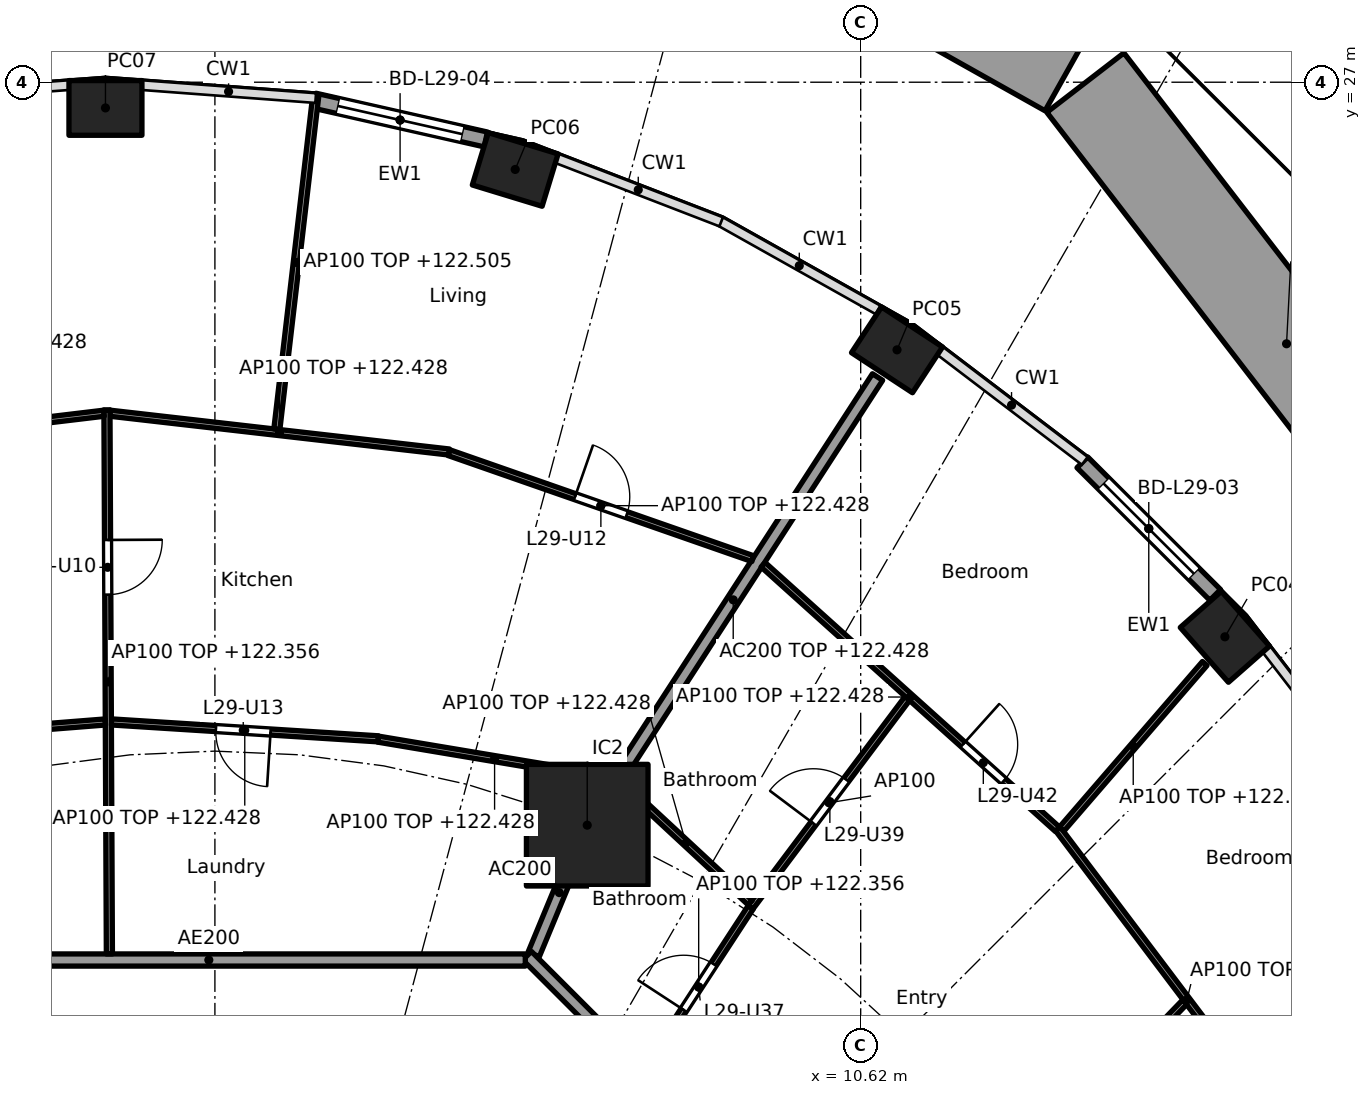
"""IFC4 building model, lengths in metres.
Left out: names, types, materials, properties, quantities, classifications, styles, units other than length and angle.
Written with IfcOpenShell. Run it as: python <this file> out.ifc"""

import sys

from ifc_helpers import new_model, si_unit, direction, frame, frame_2d, origin, origin_2d, place, context, subcontext, project, spatial, rectangle, hollow_rectangle, extrude, element, fill, save


model = new_model("IFC4")
c1 = context("Model", 3, precision=1e-05, world=origin(), true_north=direction((0.0, 1.0)))
c2 = subcontext(c1, "Body", "Model", "MODEL_VIEW")
j1 = project(units=[si_unit("LENGTHUNIT", "METRE"), si_unit("PLANEANGLEUNIT", "RADIAN")], contexts=[c1])
p1 = place(None, origin())
s1 = spatial("IfcSite", under=j1, at=p1, CompositionType="ELEMENT")
p2 = place(p1, origin())
s2 = spatial("IfcBuilding", under=s1, at=p2, CompositionType="ELEMENT")
p3 = place(p2, frame((0.0, 0.0, 119.6)))
s3 = spatial("IfcBuildingStorey", under=s2, at=p3, CompositionType="ELEMENT", Elevation=119.6)
for number, where, z_axis, x_axis in (
    (1, (16.61, 17.88, -0.26), (0.0, 0.0, 1.0), (-0.66, 0.751, 0.0)),
    (2, (11.218, 22.599, -0.26), (0.0, 0.0, 1.0), (-0.836, 0.549, 0.0)),
    (3, (4.938, 25.565, -0.26), (0.0, 0.0, 1.0), (-0.957, 0.292, 0.0)),
    (4, (-1.8, 26.577, -0.26), (0.0, 0.0, 1.0), (-1.0, 0.0, 0.0)),
):
    element("IfcColumn", number, at=place(p3, frame(where, z_axis=z_axis, x_axis=x_axis)), inside=s3, PredefinedType="COLUMN", context=c2, shape_type="SweptSolid", body=[
        extrude(hollow_rectangle(XDim=1.2, YDim=0.9, WallThickness=0.04, at=origin_2d()), origin(), (0.0, 0.0, 1.0), 3.96),
    ])
p4 = place(p3, frame((6.123, 14.782, 0.0), z_axis=(0.0, 0.0, 1.0), x_axis=(1.0, 0.0, 0.0)))
e5 = element("IfcColumn", 5, at=p4, inside=s3, PredefinedType="COLUMN", context=c2, shape_type="SweptSolid", body=[
    extrude(rectangle(XDim=2.0, YDim=2.0, at=origin_2d()), origin(), (0.0, 0.0, 1.0), 3.7),
])
p5 = place(p3, frame((14.265, 20.749, 0.0), z_axis=(0.0, 0.0, 1.0), x_axis=(0.70789728551, -0.706315392135, 0.0)))
e6 = element("IfcWall", 6, at=p5, inside=s3, PredefinedType="SOLIDWALL", context=c2, shape_type="SweptSolid", body=[
    extrude(rectangle(XDim=3.087, YDim=0.25, at=frame_2d((1.543, 0.0))), origin(), (0.0, 0.0, 1.0), 3.44),
])
p6 = place(p5, frame((0.493, 0.0, 0.0)))
e7 = element("IfcOpeningElement", 7, at=p6, cuts=e6, PredefinedType="OPENING", context=c2, shape_type="SweptSolid", body=[
    extrude(rectangle(XDim=2.1, YDim=2.4, at=frame_2d((1.05, 1.2))), frame((0.0, 0.135, 0.0), z_axis=(0.0, -1.0, 0.0), x_axis=(1.0, 0.0, 0.0)), (0.0, 0.0, 1.0), 0.27),
])
p7 = place(p3, frame((1.636, 26.697, 0.0), z_axis=(0.0, 0.0, 1.0), x_axis=(0.975339035722, -0.220711951186, 0.0)))
e8 = element("IfcWall", 8, at=p7, inside=s3, PredefinedType="SOLIDWALL", context=c2, shape_type="SweptSolid", body=[
    extrude(rectangle(XDim=2.89, YDim=0.25, at=frame_2d((1.445, 0.0))), origin(), (0.0, 0.0, 1.0), 3.44),
])
p8 = place(p7, frame((0.395, 0.0, 0.0)))
e9 = element("IfcOpeningElement", 9, at=p8, cuts=e8, PredefinedType="OPENING", context=c2, shape_type="SweptSolid", body=[
    extrude(rectangle(XDim=2.1, YDim=2.4, at=frame_2d((1.05, 1.2))), frame((0.0, 0.135, 0.0), z_axis=(0.0, -1.0, 0.0), x_axis=(1.0, 0.0, 0.0)), (0.0, 0.0, 1.0), 0.27),
])
p9 = place(p3, frame((5.161, 32.215, 0.0), z_axis=(0.0, 0.0, 1.0), x_axis=(0.87197463187, -0.489551061049, 0.0)))
e10 = element("IfcWall", 10, at=p9, inside=s3, PredefinedType="SOLIDWALL", context=c2, shape_type="SweptSolid", body=[
    extrude(rectangle(XDim=10.187, YDim=1.6, at=frame_2d((5.094, 0.0))), origin(), (0.0, 0.0, 1.0), 1.1),
])
p10 = place(p3, frame((14.315, 26.993, 0.0), z_axis=(0.0, 0.0, 1.0), x_axis=(0.610279766338, -0.792185967307, 0.0)))
e11 = element("IfcWall", 11, at=p10, inside=s3, PredefinedType="SOLIDWALL", context=c2, shape_type="SweptSolid", body=[
    extrude(rectangle(XDim=10.842, YDim=1.6, at=frame_2d((5.421, 0.0))), origin(), (0.0, 0.0, 1.0), 1.1),
])
p11 = place(p3, frame((5.243, 12.657, 0.0), z_axis=(0.0, 0.0, 1.0), x_axis=(0.38273085373, 0.923859888513, 0.0)))
e12 = element("IfcWall", 12, at=p11, inside=s3, PredefinedType="PARTITIONING", context=c2, shape_type="SweptSolid", body=[
    extrude(rectangle(XDim=2.199, YDim=0.2, at=frame_2d((1.1, 0.0))), origin(), (0.0, 0.0, 1.0), 3.44),
])
p12 = place(p3, frame((6.15, 14.824, 0.0), z_axis=(0.0, 0.0, 1.0), x_axis=(0.543695254109, 0.839282711998, 0.0)))
e13 = element("IfcWall", 13, at=p12, inside=s3, PredefinedType="PARTITIONING", context=c2, shape_type="SweptSolid", body=[
    extrude(rectangle(XDim=8.731, YDim=0.2, at=frame_2d((4.366, 0.0))), origin(), (0.0, 0.0, 1.0), 2.828),
])
p13 = place(p3, frame((12.635, 5.134, 0.0), z_axis=(0.0, 0.0, 1.0), x_axis=(-0.707106781187, 0.707106781187, 0.0)))
e14 = element("IfcWall", 14, at=p13, inside=s3, PredefinedType="PARTITIONING", context=c2, shape_type="SweptSolid", body=[
    extrude(rectangle(XDim=10.609, YDim=0.2, at=frame_2d((5.305, 0.0))), origin(), (0.0, 0.0, 1.0), 3.44),
])
p14 = place(p13, frame((4.804, 0.0, 0.0)))
e15 = element("IfcOpeningElement", 15, at=p14, cuts=e14, PredefinedType="OPENING", context=c2, shape_type="SweptSolid", body=[
    extrude(rectangle(XDim=1.0, YDim=2.1, at=frame_2d((0.5, 1.05))), frame((0.0, 0.11, 0.0), z_axis=(0.0, -1.0, 0.0), x_axis=(1.0, 0.0, 0.0)), (0.0, 0.0, 1.0), 0.22),
])
p15 = place(p3, frame((5.104, 12.565, 0.0), z_axis=(0.0, 0.0, 1.0), x_axis=(-1.0, 0.0, 0.0)))
e16 = element("IfcWall", 16, at=p15, inside=s3, PredefinedType="PARTITIONING", context=c2, shape_type="SweptSolid", body=[
    extrude(rectangle(XDim=10.409, YDim=0.2, at=frame_2d((5.205, 0.0))), origin(), (0.0, 0.0, 1.0), 3.44),
])
p16 = place(p3, frame((18.106, 9.098, 0.0), z_axis=(0.0, 0.0, 1.0), x_axis=(-0.602398572907, 0.798195439325, 0.0)))
e17 = element("IfcWall", 17, at=p16, inside=s3, PredefinedType="PARTITIONING", context=c2, shape_type="SweptSolid", body=[
    extrude(rectangle(XDim=7.044, YDim=0.1, at=frame_2d((3.522, 0.0))), origin(), (0.0, 0.0, 1.0), 2.828),
])
p17 = place(p3, frame((13.107, 8.929, 0.0), z_axis=(0.0, 0.0, 1.0), x_axis=(0.694592384931, 0.719403515974, 0.0)))
e18 = element("IfcWall", 18, at=p17, inside=s3, PredefinedType="PARTITIONING", context=c2, shape_type="SweptSolid", body=[
    extrude(rectangle(XDim=4.094, YDim=0.1, at=frame_2d((2.047, 0.0))), origin(), (0.0, 0.0, 1.0), 3.44),
])
p18 = place(p17, frame((1.622, 0.0, 0.0)))
e19 = element("IfcOpeningElement", 19, at=p18, cuts=e18, PredefinedType="OPENING", context=c2, shape_type="SweptSolid", body=[
    extrude(rectangle(XDim=0.9, YDim=2.1, at=frame_2d((0.45, 1.05))), frame((0.0, 0.06, 0.0), z_axis=(0.0, -1.0, 0.0), x_axis=(1.0, 0.0, 0.0)), (0.0, 0.0, 1.0), 0.12),
])
p19 = place(p3, frame((13.926, 14.719, 0.0), z_axis=(0.0, 0.0, 1.0), x_axis=(0.653831857253, 0.756639876323, 0.0)))
e20 = element("IfcWall", 20, at=p19, inside=s3, PredefinedType="PARTITIONING", context=c2, shape_type="SweptSolid", body=[
    extrude(rectangle(XDim=3.598, YDim=0.1, at=frame_2d((1.799, 0.0))), origin(), (0.0, 0.0, 1.0), 2.828),
])
p20 = place(p3, frame((13.856, 14.714, 0.0), z_axis=(0.0, 0.0, 1.0), x_axis=(-0.743799395746, 0.668402916577, 0.0)))
e21 = element("IfcWall", 21, at=p20, inside=s3, PredefinedType="PARTITIONING", context=c2, shape_type="SweptSolid", body=[
    extrude(rectangle(XDim=6.509, YDim=0.1, at=frame_2d((3.254, 0.0))), origin(), (0.0, 0.0, 1.0), 2.828),
])
p21 = place(p20, frame((1.19, 0.0, 0.0)))
e22 = element("IfcOpeningElement", 22, at=p21, cuts=e21, PredefinedType="OPENING", context=c2, shape_type="SweptSolid", body=[
    extrude(rectangle(XDim=0.9, YDim=2.1, at=frame_2d((0.45, 1.05))), frame((0.0, 0.06, 0.0), z_axis=(0.0, -1.0, 0.0), x_axis=(1.0, 0.0, 0.0)), (0.0, 0.0, 1.0), 0.12),
])
p22 = place(p3, frame((7.099, 10.808, 0.0), z_axis=(0.0, 0.0, 1.0), x_axis=(0.546709757921, 0.837322184463, 0.0)))
e23 = element("IfcWall", 23, at=p22, inside=s3, PredefinedType="PARTITIONING", context=c2, shape_type="SweptSolid", body=[
    extrude(rectangle(XDim=3.134, YDim=0.1, at=frame_2d((1.567, 0.0))), origin(), (0.0, 0.0, 1.0), 2.756),
])
p23 = place(p22, frame((1.117, 0.0, 0.0)))
e24 = element("IfcOpeningElement", 24, at=p23, cuts=e23, PredefinedType="OPENING", context=c2, shape_type="SweptSolid", body=[
    extrude(rectangle(XDim=0.9, YDim=2.1, at=frame_2d((0.45, 1.05))), frame((0.0, 0.06, 0.0), z_axis=(0.0, -1.0, 0.0), x_axis=(1.0, 0.0, 0.0)), (0.0, 0.0, 1.0), 0.12),
])
p24 = place(p3, frame((8.81, 13.434, 0.0), z_axis=(0.0, 0.0, 1.0), x_axis=(0.600491337497, 0.799631261014, 0.0)))
e25 = element("IfcWall", 25, at=p24, inside=s3, PredefinedType="PARTITIONING", context=c2, shape_type="SweptSolid", body=[
    extrude(rectangle(XDim=4.292, YDim=0.1, at=frame_2d((2.146, 0.0))), origin(), (0.0, 0.0, 1.0), 3.44),
])
p25 = place(p24, frame((1.721, 0.0, 0.0)))
e26 = element("IfcOpeningElement", 26, at=p25, cuts=e25, PredefinedType="OPENING", context=c2, shape_type="SweptSolid", body=[
    extrude(rectangle(XDim=0.9, YDim=2.1, at=frame_2d((0.45, 1.05))), frame((0.0, 0.06, 0.0), z_axis=(0.0, -1.0, 0.0), x_axis=(1.0, 0.0, 0.0)), (0.0, 0.0, 1.0), 0.12),
])
p26 = place(p3, frame((8.803, 13.508, 0.0), z_axis=(0.0, 0.0, 1.0), x_axis=(-0.733124766325, 0.680094167745, 0.0)))
e27 = element("IfcWall", 27, at=p26, inside=s3, PredefinedType="PARTITIONING", context=c2, shape_type="SweptSolid", body=[
    extrude(rectangle(XDim=2.886, YDim=0.1, at=frame_2d((1.443, 0.0))), origin(), (0.0, 0.0, 1.0), 2.828),
])
p27 = place(p3, frame((6.515, 15.556, 0.0), z_axis=(0.0, 0.0, 1.0), x_axis=(-0.986271328884, 0.16513287323, 0.0)))
e28 = element("IfcWall", 28, at=p27, inside=s3, PredefinedType="PARTITIONING", context=c2, shape_type="SweptSolid", body=[
    extrude(rectangle(XDim=3.884, YDim=0.1, at=frame_2d((1.942, 0.0))), origin(), (0.0, 0.0, 1.0), 2.828),
])
p28 = place(p3, frame((8.846, 19.165, 0.0), z_axis=(0.0, 0.0, 1.0), x_axis=(-0.944186503813, 0.329411362915, 0.0)))
e29 = element("IfcWall", 29, at=p28, inside=s3, PredefinedType="PARTITIONING", context=c2, shape_type="SweptSolid", body=[
    extrude(rectangle(XDim=5.293, YDim=0.1, at=frame_2d((2.646, 0.0))), origin(), (0.0, 0.0, 1.0), 2.828),
])
p29 = place(p28, frame((2.197, 0.0, 0.0)))
e30 = element("IfcOpeningElement", 30, at=p29, cuts=e29, PredefinedType="OPENING", context=c2, shape_type="SweptSolid", body=[
    extrude(rectangle(XDim=0.9, YDim=2.1, at=frame_2d((0.45, 1.05))), frame((0.0, 0.06, 0.0), z_axis=(0.0, -1.0, 0.0), x_axis=(1.0, 0.0, 0.0)), (0.0, 0.0, 1.0), 0.12),
])
p30 = place(p3, frame((2.685, 16.202, 0.0), z_axis=(0.0, 0.0, 1.0), x_axis=(-0.998000808042, 0.063201164138, 0.0)))
e31 = element("IfcWall", 31, at=p30, inside=s3, PredefinedType="PARTITIONING", context=c2, shape_type="SweptSolid", body=[
    extrude(rectangle(XDim=4.396, YDim=0.1, at=frame_2d((2.198, 0.0))), origin(), (0.0, 0.0, 1.0), 2.828),
])
p31 = place(p30, frame((1.773, 0.0, 0.0)))
e32 = element("IfcOpeningElement", 32, at=p31, cuts=e31, PredefinedType="OPENING", context=c2, shape_type="SweptSolid", body=[
    extrude(rectangle(XDim=0.9, YDim=2.1, at=frame_2d((0.45, 1.05))), frame((0.0, 0.06, 0.0), z_axis=(0.0, -1.0, 0.0), x_axis=(1.0, 0.0, 0.0)), (0.0, 0.0, 1.0), 0.12),
])
p32 = place(p3, frame((3.851, 20.919, 0.0), z_axis=(0.0, 0.0, 1.0), x_axis=(-0.993519908136, 0.11365822512, 0.0)))
e33 = element("IfcWall", 33, at=p32, inside=s3, PredefinedType="PARTITIONING", context=c2, shape_type="SweptSolid", body=[
    extrude(rectangle(XDim=5.613, YDim=0.1, at=frame_2d((2.806, 0.0))), origin(), (0.0, 0.0, 1.0), 2.828),
])
p33 = place(p3, frame((1.019, 21.293, 0.0), z_axis=(0.0, 0.0, 1.0), x_axis=(0.11589741608, 0.993261188684, 0.0)))
e34 = element("IfcWall", 34, at=p33, inside=s3, PredefinedType="PARTITIONING", context=c2, shape_type="SweptSolid", body=[
    extrude(rectangle(XDim=5.523, YDim=0.1, at=frame_2d((2.762, 0.0))), origin(), (0.0, 0.0, 1.0), 2.905),
])
p34 = place(p3, frame((-1.735, 12.665, 0.0), z_axis=(0.0, 0.0, 1.0), x_axis=(-0.004474716456, 0.999989988406, 0.0)))
e35 = element("IfcWall", 35, at=p34, inside=s3, PredefinedType="PARTITIONING", context=c2, shape_type="SweptSolid", body=[
    extrude(rectangle(XDim=8.948, YDim=0.1, at=frame_2d((4.474, 0.0))), origin(), (0.0, 0.0, 1.0), 2.756),
])
p35 = place(p34, frame((5.908, 0.0, 0.0)))
e36 = element("IfcOpeningElement", 36, at=p35, cuts=e35, PredefinedType="OPENING", context=c2, shape_type="SweptSolid", body=[
    extrude(rectangle(XDim=0.9, YDim=2.1, at=frame_2d((0.45, 1.05))), frame((0.0, 0.06, 0.0), z_axis=(0.0, -1.0, 0.0), x_axis=(1.0, 0.0, 0.0)), (0.0, 0.0, 1.0), 0.12),
])
p36 = place(p3, frame((-1.802, 16.479, 0.0), z_axis=(0.0, 0.0, 1.0), x_axis=(-0.996909003513, -0.078564869469, 0.0)))
e37 = element("IfcWall", 37, at=p36, inside=s3, PredefinedType="PARTITIONING", context=c2, shape_type="SweptSolid", body=[
    extrude(rectangle(XDim=4.686, YDim=0.1, at=frame_2d((2.343, 0.0))), origin(), (0.0, 0.0, 1.0), 2.828),
])
p37 = place(p36, frame((1.868, 0.0, 0.0)))
e38 = element("IfcOpeningElement", 38, at=p37, cuts=e37, PredefinedType="OPENING", context=c2, shape_type="SweptSolid", body=[
    extrude(rectangle(XDim=0.9, YDim=2.1, at=frame_2d((0.45, 1.05))), frame((0.0, 0.06, 0.0), z_axis=(0.0, -1.0, 0.0), x_axis=(1.0, 0.0, 0.0)), (0.0, 0.0, 1.0), 0.12),
])
p38 = place(p3, frame((-1.825, 21.557, 0.0), z_axis=(0.0, 0.0, 1.0), x_axis=(-0.992915657947, -0.118821278412, 0.0)))
e39 = element("IfcWall", 39, at=p38, inside=s3, PredefinedType="PARTITIONING", context=c2, shape_type="SweptSolid", body=[
    extrude(rectangle(XDim=5.765, YDim=0.1, at=frame_2d((2.883, 0.0))), origin(), (0.0, 0.0, 1.0), 2.828),
])
p39 = place(p38, frame((2.408, 0.0, 0.0)))
e40 = element("IfcOpeningElement", 40, at=p39, cuts=e39, PredefinedType="OPENING", context=c2, shape_type="SweptSolid", body=[
    extrude(rectangle(XDim=0.9, YDim=2.1, at=frame_2d((0.45, 1.05))), frame((0.0, 0.06, 0.0), z_axis=(0.0, -1.0, 0.0), x_axis=(1.0, 0.0, 0.0)), (0.0, 0.0, 1.0), 0.12),
])
p40 = place(p6, origin())
e41 = element("IfcDoor", 41, at=p40, inside=s3, OperationType="SLIDING_TO_LEFT", PredefinedType="DOOR", context=c2, shape_type="SweptSolid", body=[
    extrude(rectangle(XDim=2.1, YDim=2.4, at=frame_2d((1.05, 1.2))), frame((0.0, 0.025, 0.0), z_axis=(0.0, -1.0, 0.0), x_axis=(1.0, 0.0, 0.0)), (0.0, 0.0, 1.0), 0.05),
])
fill(e7, e41)
p41 = place(p8, origin())
e42 = element("IfcDoor", 42, at=p41, inside=s3, OperationType="SLIDING_TO_LEFT", PredefinedType="DOOR", context=c2, shape_type="SweptSolid", body=[
    extrude(rectangle(XDim=2.1, YDim=2.4, at=frame_2d((1.05, 1.2))), frame((0.0, 0.025, 0.0), z_axis=(0.0, -1.0, 0.0), x_axis=(1.0, 0.0, 0.0)), (0.0, 0.0, 1.0), 0.05),
])
fill(e9, e42)
p42 = place(p35, frame((0.9, 0.0, 0.0), x_axis=(-1.0, 0.0, 0.0)))
e43 = element("IfcDoor", 43, at=p42, inside=s3, OperationType="SINGLE_SWING_LEFT", PredefinedType="DOOR", context=c2, shape_type="SweptSolid", body=[
    extrude(rectangle(XDim=0.9, YDim=2.1, at=frame_2d((0.45, 1.05))), frame((0.0, 0.025, 0.0), z_axis=(0.0, -1.0, 0.0), x_axis=(1.0, 0.0, 0.0)), (0.0, 0.0, 1.0), 0.05),
])
fill(e36, e43)
p43 = place(p29, frame((0.9, 0.0, 0.0), x_axis=(-1.0, 0.0, 0.0)))
e44 = element("IfcDoor", 44, at=p43, inside=s3, OperationType="SINGLE_SWING_LEFT", PredefinedType="DOOR", context=c2, shape_type="SweptSolid", body=[
    extrude(rectangle(XDim=0.9, YDim=2.1, at=frame_2d((0.45, 1.05))), frame((0.0, 0.025, 0.0), z_axis=(0.0, -1.0, 0.0), x_axis=(1.0, 0.0, 0.0)), (0.0, 0.0, 1.0), 0.05),
])
fill(e30, e44)
p44 = place(p31, origin())
e45 = element("IfcDoor", 45, at=p44, inside=s3, OperationType="SINGLE_SWING_LEFT", PredefinedType="DOOR", context=c2, shape_type="SweptSolid", body=[
    extrude(rectangle(XDim=0.9, YDim=2.1, at=frame_2d((0.45, 1.05))), frame((0.0, 0.025, 0.0), z_axis=(0.0, -1.0, 0.0), x_axis=(1.0, 0.0, 0.0)), (0.0, 0.0, 1.0), 0.05),
])
fill(e32, e45)
p45 = place(p23, origin())
e46 = element("IfcDoor", 46, at=p45, inside=s3, OperationType="SINGLE_SWING_LEFT", PredefinedType="DOOR", context=c2, shape_type="SweptSolid", body=[
    extrude(rectangle(XDim=0.9, YDim=2.1, at=frame_2d((0.45, 1.05))), frame((0.0, 0.025, 0.0), z_axis=(0.0, -1.0, 0.0), x_axis=(1.0, 0.0, 0.0)), (0.0, 0.0, 1.0), 0.05),
])
fill(e24, e46)
p46 = place(p25, origin())
e47 = element("IfcDoor", 47, at=p46, inside=s3, OperationType="SINGLE_SWING_LEFT", PredefinedType="DOOR", context=c2, shape_type="SweptSolid", body=[
    extrude(rectangle(XDim=0.9, YDim=2.1, at=frame_2d((0.45, 1.05))), frame((0.0, 0.025, 0.0), z_axis=(0.0, -1.0, 0.0), x_axis=(1.0, 0.0, 0.0)), (0.0, 0.0, 1.0), 0.05),
])
fill(e26, e47)
p47 = place(p21, frame((0.9, 0.0, 0.0), x_axis=(-1.0, 0.0, 0.0)))
e48 = element("IfcDoor", 48, at=p47, inside=s3, OperationType="SINGLE_SWING_LEFT", PredefinedType="DOOR", context=c2, shape_type="SweptSolid", body=[
    extrude(rectangle(XDim=0.9, YDim=2.1, at=frame_2d((0.45, 1.05))), frame((0.0, 0.025, 0.0), z_axis=(0.0, -1.0, 0.0), x_axis=(1.0, 0.0, 0.0)), (0.0, 0.0, 1.0), 0.05),
])
fill(e22, e48)
save(model, sys.argv[1])
